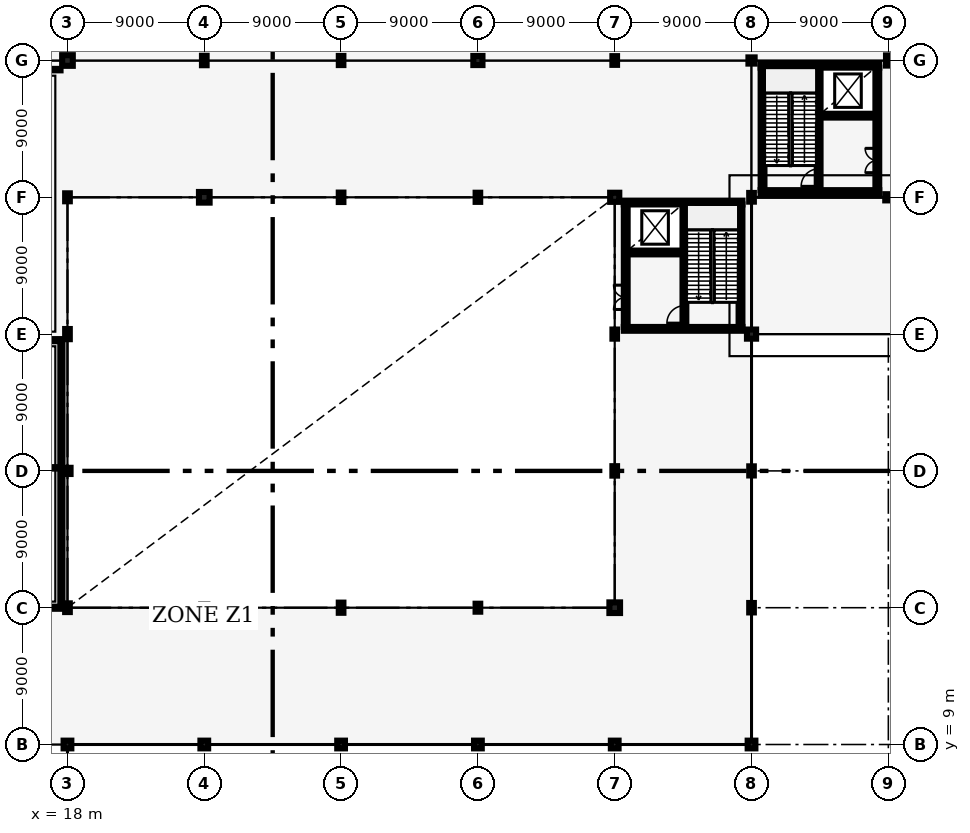
"""IFC4 building model, lengths in metres.
Left out: names, types, materials, properties, quantities, classifications, styles, units other than length and angle.
Written with IfcOpenShell. Run it as: python <this file> out.ifc"""

import sys

from ifc_helpers import new_model, si_unit, direction, frame, frame_2d, origin, origin_2d, place, context, subcontext, project, spatial, rectangle, hollow_circle, i_section, extrude, element, fill, save


model = new_model("IFC4")
c1 = context("Model", 3, precision=1e-05, world=origin(), true_north=direction((0.0, 1.0)))
c2 = subcontext(c1, "Body", "Model", "MODEL_VIEW")
j1 = project(units=[si_unit("LENGTHUNIT", "METRE"), si_unit("PLANEANGLEUNIT", "RADIAN")], contexts=[c1])
p1 = place(None, origin())
s1 = spatial("IfcSite", under=j1, at=p1, CompositionType="ELEMENT")
p2 = place(p1, origin())
s2 = spatial("IfcBuilding", under=s1, at=p2, CompositionType="ELEMENT")
p3 = place(p2, frame((0.0, 0.0, 6.0)))
s3 = spatial("IfcBuildingStorey", under=s2, at=p3, CompositionType="ELEMENT", Elevation=6.0)
p4 = place(p3, frame((18.0, 9.0, 0.0), z_axis=(0.0, 0.0, 1.0), x_axis=(1.0, 0.0, 0.0)))
e1 = element("IfcColumn", 1, at=p4, inside=s3, PredefinedType="COLUMN", context=c2, shape_type="SweptSolid", body=[
    extrude(hollow_circle(Radius=0.254, WallThickness=0.02, at=origin_2d()), origin(), (0.0, 0.0, 1.0), 6.0),
])
p5 = place(p3, frame((18.0, 18.0, 0.0), z_axis=(0.0, 0.0, 1.0), x_axis=(1.0, 0.0, 0.0)))
e2 = element("IfcColumn", 2, at=p5, inside=s3, PredefinedType="COLUMN", context=c2, shape_type="SweptSolid", body=[
    extrude(i_section(OverallWidth=0.306, OverallDepth=0.572, WebThickness=0.021, FlangeThickness=0.04, FilletRadius=0.027, at=origin_2d()), origin(), (0.0, 0.0, 1.0), 6.0),
])
p6 = place(p3, frame((18.0, 27.0, 0.0), z_axis=(0.0, 0.0, 1.0), x_axis=(1.0, 0.0, 0.0)))
e3 = element("IfcColumn", 3, at=p6, inside=s3, PredefinedType="COLUMN", context=c2, shape_type="SweptSolid", body=[
    extrude(hollow_circle(Radius=0.203, WallThickness=0.016, at=origin_2d()), origin(), (0.0, 0.0, 1.0), 6.0),
])
p7 = place(p3, frame((18.0, 36.0, 0.0), z_axis=(0.0, 0.0, 1.0), x_axis=(1.0, 0.0, 0.0)))
e4 = element("IfcColumn", 4, at=p7, inside=s3, PredefinedType="COLUMN", context=c2, shape_type="SweptSolid", body=[
    extrude(i_section(OverallWidth=0.305, OverallDepth=0.668, WebThickness=0.021, FlangeThickness=0.04, FilletRadius=0.027, at=origin_2d()), origin(), (0.0, 0.0, 1.0), 6.0),
])
p8 = place(p3, frame((18.0, 45.0, 0.0), z_axis=(0.0, 0.0, 1.0), x_axis=(1.0, 0.0, 0.0)))
e5 = element("IfcColumn", 5, at=p8, inside=s3, PredefinedType="COLUMN", context=c2, shape_type="SweptSolid", body=[
    extrude(i_section(OverallWidth=0.306, OverallDepth=0.524, WebThickness=0.021, FlangeThickness=0.04, FilletRadius=0.027, at=origin_2d()), origin(), (0.0, 0.0, 1.0), 6.0),
])
p9 = place(p3, frame((18.0, 54.0, 0.0), z_axis=(0.0, 0.0, 1.0), x_axis=(1.0, 0.0, 0.0)))
e6 = element("IfcColumn", 6, at=p9, inside=s3, PredefinedType="COLUMN", context=c2, shape_type="SweptSolid", body=[
    extrude(rectangle(XDim=0.7, YDim=0.7, at=origin_2d()), origin(), (0.0, 0.0, 1.0), 6.0),
])
p10 = place(p3, frame((27.0, 9.0, 0.0), z_axis=(0.0, 0.0, 1.0), x_axis=(1.0, 0.0, 0.0)))
e7 = element("IfcColumn", 7, at=p10, inside=s3, PredefinedType="COLUMN", context=c2, shape_type="SweptSolid", body=[
    extrude(hollow_circle(Radius=0.254, WallThickness=0.02, at=origin_2d()), origin(), (0.0, 0.0, 1.0), 6.0),
])
p11 = place(p3, frame((27.0, 18.0, 0.0), z_axis=(0.0, 0.0, 1.0), x_axis=(1.0, 0.0, 0.0)))
e8 = element("IfcColumn", 8, at=p11, inside=s3, PredefinedType="COLUMN", context=c2, shape_type="SweptSolid", body=[
    extrude(hollow_circle(Radius=0.203, WallThickness=0.016, at=origin_2d()), origin(), (0.0, 0.0, 1.0), 6.0),
])
p12 = place(p3, frame((27.0, 45.0, 0.0), z_axis=(0.0, 0.0, 1.0), x_axis=(1.0, 0.0, 0.0)))
e9 = element("IfcColumn", 9, at=p12, inside=s3, PredefinedType="COLUMN", context=c2, shape_type="SweptSolid", body=[
    extrude(rectangle(XDim=0.7, YDim=0.7, at=origin_2d()), origin(), (0.0, 0.0, 1.0), 6.0),
])
p13 = place(p3, frame((27.0, 54.0, 0.0), z_axis=(0.0, 0.0, 1.0), x_axis=(1.0, 0.0, 0.0)))
e10 = element("IfcColumn", 10, at=p13, inside=s3, PredefinedType="COLUMN", context=c2, shape_type="SweptSolid", body=[
    extrude(i_section(OverallWidth=0.305, OverallDepth=0.62, WebThickness=0.021, FlangeThickness=0.04, FilletRadius=0.027, at=origin_2d()), origin(), (0.0, 0.0, 1.0), 6.0),
])
p14 = place(p3, frame((36.0, 9.0, 0.0), z_axis=(0.0, 0.0, 1.0), x_axis=(1.0, 0.0, 0.0)))
e11 = element("IfcColumn", 11, at=p14, inside=s3, PredefinedType="COLUMN", context=c2, shape_type="SweptSolid", body=[
    extrude(hollow_circle(Radius=0.254, WallThickness=0.02, at=origin_2d()), origin(), (0.0, 0.0, 1.0), 6.0),
])
p15 = place(p3, frame((36.0, 18.0, 0.0), z_axis=(0.0, 0.0, 1.0), x_axis=(1.0, 0.0, 0.0)))
e12 = element("IfcColumn", 12, at=p15, inside=s3, PredefinedType="COLUMN", context=c2, shape_type="SweptSolid", body=[
    extrude(i_section(OverallWidth=0.305, OverallDepth=0.668, WebThickness=0.021, FlangeThickness=0.04, FilletRadius=0.027, at=origin_2d()), origin(), (0.0, 0.0, 1.0), 6.0),
])
p16 = place(p3, frame((36.0, 45.0, 0.0), z_axis=(0.0, 0.0, 1.0), x_axis=(1.0, 0.0, 0.0)))
e13 = element("IfcColumn", 13, at=p16, inside=s3, PredefinedType="COLUMN", context=c2, shape_type="SweptSolid", body=[
    extrude(i_section(OverallWidth=0.305, OverallDepth=0.62, WebThickness=0.021, FlangeThickness=0.04, FilletRadius=0.027, at=origin_2d()), origin(), (0.0, 0.0, 1.0), 6.0),
])
p17 = place(p3, frame((36.0, 54.0, 0.0), z_axis=(0.0, 0.0, 1.0), x_axis=(1.0, 0.0, 0.0)))
e14 = element("IfcColumn", 14, at=p17, inside=s3, PredefinedType="COLUMN", context=c2, shape_type="SweptSolid", body=[
    extrude(i_section(OverallWidth=0.3, OverallDepth=0.6, WebThickness=0.015, FlangeThickness=0.03, FilletRadius=0.027, at=origin_2d()), origin(), (0.0, 0.0, 1.0), 6.0),
])
p18 = place(p3, frame((45.0, 9.0, 0.0), z_axis=(0.0, 0.0, 1.0), x_axis=(1.0, 0.0, 0.0)))
e15 = element("IfcColumn", 15, at=p18, inside=s3, PredefinedType="COLUMN", context=c2, shape_type="SweptSolid", body=[
    extrude(hollow_circle(Radius=0.254, WallThickness=0.02, at=origin_2d()), origin(), (0.0, 0.0, 1.0), 6.0),
])
p19 = place(p3, frame((45.0, 18.0, 0.0), z_axis=(0.0, 0.0, 1.0), x_axis=(1.0, 0.0, 0.0)))
e16 = element("IfcColumn", 16, at=p19, inside=s3, PredefinedType="COLUMN", context=c2, shape_type="SweptSolid", body=[
    extrude(i_section(OverallWidth=0.306, OverallDepth=0.524, WebThickness=0.021, FlangeThickness=0.04, FilletRadius=0.027, at=origin_2d()), origin(), (0.0, 0.0, 1.0), 6.0),
])
p20 = place(p3, frame((45.0, 45.0, 0.0), z_axis=(0.0, 0.0, 1.0), x_axis=(1.0, 0.0, 0.0)))
e17 = element("IfcColumn", 17, at=p20, inside=s3, PredefinedType="COLUMN", context=c2, shape_type="SweptSolid", body=[
    extrude(i_section(OverallWidth=0.3, OverallDepth=0.6, WebThickness=0.015, FlangeThickness=0.03, FilletRadius=0.027, at=origin_2d()), origin(), (0.0, 0.0, 1.0), 6.0),
])
p21 = place(p3, frame((45.0, 54.0, 0.0), z_axis=(0.0, 0.0, 1.0), x_axis=(1.0, 0.0, 0.0)))
e18 = element("IfcColumn", 18, at=p21, inside=s3, PredefinedType="COLUMN", context=c2, shape_type="SweptSolid", body=[
    extrude(rectangle(XDim=0.6, YDim=0.6, at=origin_2d()), origin(), (0.0, 0.0, 1.0), 6.0),
])
p22 = place(p3, frame((54.0, 9.0, 0.0), z_axis=(0.0, 0.0, 1.0), x_axis=(1.0, 0.0, 0.0)))
e19 = element("IfcColumn", 19, at=p22, inside=s3, PredefinedType="COLUMN", context=c2, shape_type="SweptSolid", body=[
    extrude(hollow_circle(Radius=0.254, WallThickness=0.02, at=origin_2d()), origin(), (0.0, 0.0, 1.0), 6.0),
])
p23 = place(p3, frame((54.0, 18.0, 0.0), z_axis=(0.0, 0.0, 1.0), x_axis=(1.0, 0.0, 0.0)))
e20 = element("IfcColumn", 20, at=p23, inside=s3, PredefinedType="COLUMN", context=c2, shape_type="SweptSolid", body=[
    extrude(rectangle(XDim=0.7, YDim=0.7, at=origin_2d()), origin(), (0.0, 0.0, 1.0), 6.0),
])
p24 = place(p3, frame((54.0, 27.0, 0.0), z_axis=(0.0, 0.0, 1.0), x_axis=(1.0, 0.0, 0.0)))
e21 = element("IfcColumn", 21, at=p24, inside=s3, PredefinedType="COLUMN", context=c2, shape_type="SweptSolid", body=[
    extrude(i_section(OverallWidth=0.305, OverallDepth=0.62, WebThickness=0.021, FlangeThickness=0.04, FilletRadius=0.027, at=origin_2d()), origin(), (0.0, 0.0, 1.0), 6.0),
])
p25 = place(p3, frame((54.0, 36.0, 0.0), z_axis=(0.0, 0.0, 1.0), x_axis=(1.0, 0.0, 0.0)))
e22 = element("IfcColumn", 22, at=p25, inside=s3, PredefinedType="COLUMN", context=c2, shape_type="SweptSolid", body=[
    extrude(i_section(OverallWidth=0.3, OverallDepth=0.6, WebThickness=0.015, FlangeThickness=0.03, FilletRadius=0.027, at=origin_2d()), origin(), (0.0, 0.0, 1.0), 6.0),
])
p26 = place(p3, frame((54.0, 45.0, 0.0), z_axis=(0.0, 0.0, 1.0), x_axis=(1.0, 0.0, 0.0)))
e23 = element("IfcColumn", 23, at=p26, inside=s3, PredefinedType="COLUMN", context=c2, shape_type="SweptSolid", body=[
    extrude(rectangle(XDim=0.6, YDim=0.6, at=origin_2d()), origin(), (0.0, 0.0, 1.0), 6.0),
])
p27 = place(p3, frame((54.0, 54.0, 0.0), z_axis=(0.0, 0.0, 1.0), x_axis=(1.0, 0.0, 0.0)))
e24 = element("IfcColumn", 24, at=p27, inside=s3, PredefinedType="COLUMN", context=c2, shape_type="SweptSolid", body=[
    extrude(i_section(OverallWidth=0.306, OverallDepth=0.572, WebThickness=0.021, FlangeThickness=0.04, FilletRadius=0.027, at=origin_2d()), origin(), (0.0, 0.0, 1.0), 6.0),
])
p28 = place(p3, frame((63.0, 9.0, 0.0), z_axis=(0.0, 0.0, 1.0), x_axis=(1.0, 0.0, 0.0)))
e25 = element("IfcColumn", 25, at=p28, inside=s3, PredefinedType="COLUMN", context=c2, shape_type="SweptSolid", body=[
    extrude(hollow_circle(Radius=0.254, WallThickness=0.02, at=origin_2d()), origin(), (0.0, 0.0, 1.0), 6.0),
])
p29 = place(p3, frame((63.0, 18.0, 0.0), z_axis=(0.0, 0.0, 1.0), x_axis=(1.0, 0.0, 0.0)))
e26 = element("IfcColumn", 26, at=p29, inside=s3, PredefinedType="COLUMN", context=c2, shape_type="SweptSolid", body=[
    extrude(i_section(OverallWidth=0.305, OverallDepth=0.62, WebThickness=0.021, FlangeThickness=0.04, FilletRadius=0.027, at=origin_2d()), origin(), (0.0, 0.0, 1.0), 6.0),
])
p30 = place(p3, frame((63.0, 27.0, 0.0), z_axis=(0.0, 0.0, 1.0), x_axis=(1.0, 0.0, 0.0)))
e27 = element("IfcColumn", 27, at=p30, inside=s3, PredefinedType="COLUMN", context=c2, shape_type="SweptSolid", body=[
    extrude(i_section(OverallWidth=0.3, OverallDepth=0.6, WebThickness=0.015, FlangeThickness=0.03, FilletRadius=0.027, at=origin_2d()), origin(), (0.0, 0.0, 1.0), 6.0),
])
p31 = place(p3, frame((63.0, 36.0, 0.0), z_axis=(0.0, 0.0, 1.0), x_axis=(1.0, 0.0, 0.0)))
e28 = element("IfcColumn", 28, at=p31, inside=s3, PredefinedType="COLUMN", context=c2, shape_type="SweptSolid", body=[
    extrude(rectangle(XDim=0.6, YDim=0.6, at=origin_2d()), origin(), (0.0, 0.0, 1.0), 6.0),
])
p32 = place(p3, frame((63.0, 45.0, 0.0), z_axis=(0.0, 0.0, 1.0), x_axis=(1.0, 0.0, 0.0)))
e29 = element("IfcColumn", 29, at=p32, inside=s3, PredefinedType="COLUMN", context=c2, shape_type="SweptSolid", body=[
    extrude(i_section(OverallWidth=0.306, OverallDepth=0.572, WebThickness=0.021, FlangeThickness=0.04, FilletRadius=0.027, at=origin_2d()), origin(), (0.0, 0.0, 1.0), 6.0),
])
for number, where, z_axis, x_axis in (
    (30, (63.0, 54.0, 0.0), (0.0, 0.0, 1.0), (1.0, 0.0, 0.0)),
    (31, (72.0, 45.0, 0.0), (0.0, 0.0, 1.0), (1.0, 0.0, 0.0)),
):
    element("IfcColumn", number, at=place(p3, frame(where, z_axis=z_axis, x_axis=x_axis)), inside=s3, PredefinedType="COLUMN", context=c2, shape_type="SweptSolid", body=[
        extrude(hollow_circle(Radius=0.203, WallThickness=0.016, at=origin_2d()), origin(), (0.0, 0.0, 1.0), 6.0),
    ])
p33 = place(p3, frame((72.0, 54.0, 0.0), z_axis=(0.0, 0.0, 1.0), x_axis=(1.0, 0.0, 0.0)))
e32 = element("IfcColumn", 32, at=p33, inside=s3, PredefinedType="COLUMN", context=c2, shape_type="SweptSolid", body=[
    extrude(i_section(OverallWidth=0.305, OverallDepth=0.668, WebThickness=0.021, FlangeThickness=0.04, FilletRadius=0.027, at=origin_2d()), origin(), (0.0, 0.0, 1.0), 6.0),
])
p34 = place(p3, frame((54.725, 36.47, 0.0), z_axis=(0.0, 0.0, 1.0), x_axis=(0.0, 1.0, 0.0)))
e33 = element("IfcWall", 33, at=p34, inside=s3, PredefinedType="SHEAR", context=c2, shape_type="SweptSolid", body=[
    extrude(rectangle(XDim=8.06, YDim=0.25, at=frame_2d((4.03, 0.0))), origin(), (0.0, 0.0, 1.0), 5.7),
])
p35 = place(p34, frame((1.15, 0.0, 0.0)))
e34 = element("IfcOpeningElement", 34, at=p35, cuts=e33, PredefinedType="OPENING", context=c2, shape_type="SweptSolid", body=[
    extrude(rectangle(XDim=1.6, YDim=2.2, at=frame_2d((0.8, 1.1))), frame((0.0, 0.135, 0.0), z_axis=(0.0, -1.0, 0.0), x_axis=(1.0, 0.0, 0.0)), (0.0, 0.0, 1.0), 0.27),
])
p36 = place(p3, frame((62.275, 36.47, 0.0), z_axis=(0.0, 0.0, 1.0), x_axis=(0.0, 1.0, 0.0)))
e35 = element("IfcWall", 35, at=p36, inside=s3, PredefinedType="SHEAR", context=c2, shape_type="SweptSolid", body=[
    extrude(rectangle(XDim=8.06, YDim=0.25, at=frame_2d((4.03, 0.0))), origin(), (0.0, 0.0, 1.0), 5.7),
])
for number, where, z_axis, x_axis in (
    (36, (54.6, 36.345, 0.0), (0.0, 0.0, 1.0), (1.0, 0.0, 0.0)),
    (37, (54.6, 44.655, 0.0), (0.0, 0.0, 1.0), (1.0, 0.0, 0.0)),
):
    element("IfcWall", number, at=place(p3, frame(where, z_axis=z_axis, x_axis=x_axis)), inside=s3, PredefinedType="SHEAR", context=c2, shape_type="SweptSolid", body=[
        extrude(rectangle(XDim=7.8, YDim=0.25, at=frame_2d((3.9, 0.0))), origin(), (0.0, 0.0, 1.0), 5.7),
    ])
p37 = place(p3, frame((58.585, 36.47, 0.0), z_axis=(0.0, 0.0, 1.0), x_axis=(0.0, 1.0, 0.0)))
e38 = element("IfcWall", 38, at=p37, inside=s3, PredefinedType="SHEAR", context=c2, shape_type="SweptSolid", body=[
    extrude(rectangle(XDim=8.06, YDim=0.25, at=frame_2d((4.03, 0.0))), origin(), (0.0, 0.0, 1.0), 5.7),
])
p38 = place(p37, frame((0.25, 0.0, 0.0)))
e39 = element("IfcOpeningElement", 39, at=p38, cuts=e38, PredefinedType="OPENING", context=c2, shape_type="SweptSolid", body=[
    extrude(rectangle(XDim=1.15, YDim=2.15, at=frame_2d((0.575, 1.075))), frame((0.0, 0.135, 0.0), z_axis=(0.0, -1.0, 0.0), x_axis=(1.0, 0.0, 0.0)), (0.0, 0.0, 1.0), 0.27),
])
p39 = place(p3, frame((54.85, 41.37, 0.0), z_axis=(0.0, 0.0, 1.0), x_axis=(1.0, 0.0, 0.0)))
e40 = element("IfcWall", 40, at=p39, inside=s3, PredefinedType="SHEAR", context=c2, shape_type="SweptSolid", body=[
    extrude(rectangle(XDim=3.61, YDim=0.25, at=frame_2d((1.805, 0.0))), origin(), (0.0, 0.0, 1.0), 5.7),
])
p40 = place(p39, frame((0.95, 0.0, 0.0)))
e41 = element("IfcOpeningElement", 41, at=p40, cuts=e40, PredefinedType="OPENING", context=c2, shape_type="SweptSolid", body=[
    extrude(rectangle(XDim=1.2, YDim=2.2, at=frame_2d((0.6, 1.1))), frame((0.0, 0.135, 0.0), z_axis=(0.0, -1.0, 0.0), x_axis=(1.0, 0.0, 0.0)), (0.0, 0.0, 1.0), 0.27),
])
p41 = place(p3, frame((63.725, 45.47, 0.0), z_axis=(0.0, 0.0, 1.0), x_axis=(0.0, 1.0, 0.0)))
e42 = element("IfcWall", 42, at=p41, inside=s3, PredefinedType="SHEAR", context=c2, shape_type="SweptSolid", body=[
    extrude(rectangle(XDim=8.06, YDim=0.25, at=frame_2d((4.03, 0.0))), origin(), (0.0, 0.0, 1.0), 5.71),
])
p42 = place(p3, frame((71.275, 45.47, 0.0), z_axis=(0.0, 0.0, 1.0), x_axis=(0.0, 1.0, 0.0)))
e43 = element("IfcWall", 43, at=p42, inside=s3, PredefinedType="SHEAR", context=c2, shape_type="SweptSolid", body=[
    extrude(rectangle(XDim=8.06, YDim=0.25, at=frame_2d((4.03, 0.0))), origin(), (0.0, 0.0, 1.0), 5.71),
])
p43 = place(p42, frame((1.15, 0.0, 0.0)))
e44 = element("IfcOpeningElement", 44, at=p43, cuts=e43, PredefinedType="OPENING", context=c2, shape_type="SweptSolid", body=[
    extrude(rectangle(XDim=1.6, YDim=2.2, at=frame_2d((0.8, 1.1))), frame((0.0, 0.135, 0.0), z_axis=(0.0, -1.0, 0.0), x_axis=(1.0, 0.0, 0.0)), (0.0, 0.0, 1.0), 0.27),
])
for number, where, z_axis, x_axis in (
    (45, (63.6, 45.345, 0.0), (0.0, 0.0, 1.0), (1.0, 0.0, 0.0)),
    (46, (63.6, 53.655, 0.0), (0.0, 0.0, 1.0), (1.0, 0.0, 0.0)),
):
    element("IfcWall", number, at=place(p3, frame(where, z_axis=z_axis, x_axis=x_axis)), inside=s3, PredefinedType="SHEAR", context=c2, shape_type="SweptSolid", body=[
        extrude(rectangle(XDim=7.8, YDim=0.25, at=frame_2d((3.9, 0.0))), origin(), (0.0, 0.0, 1.0), 5.71),
    ])
p44 = place(p3, frame((67.415, 45.47, 0.0), z_axis=(0.0, 0.0, 1.0), x_axis=(0.0, 1.0, 0.0)))
e47 = element("IfcWall", 47, at=p44, inside=s3, PredefinedType="SHEAR", context=c2, shape_type="SweptSolid", body=[
    extrude(rectangle(XDim=8.06, YDim=0.25, at=frame_2d((4.03, 0.0))), origin(), (0.0, 0.0, 1.0), 5.71),
])
p45 = place(p44, frame((0.25, 0.0, 0.0)))
e48 = element("IfcOpeningElement", 48, at=p45, cuts=e47, PredefinedType="OPENING", context=c2, shape_type="SweptSolid", body=[
    extrude(rectangle(XDim=1.15, YDim=2.15, at=frame_2d((0.575, 1.075))), frame((0.0, 0.135, 0.0), z_axis=(0.0, -1.0, 0.0), x_axis=(1.0, 0.0, 0.0)), (0.0, 0.0, 1.0), 0.27),
])
p46 = place(p3, frame((67.54, 50.37, 0.0), z_axis=(0.0, 0.0, 1.0), x_axis=(1.0, 0.0, 0.0)))
e49 = element("IfcWall", 49, at=p46, inside=s3, PredefinedType="SHEAR", context=c2, shape_type="SweptSolid", body=[
    extrude(rectangle(XDim=3.61, YDim=0.25, at=frame_2d((1.805, 0.0))), origin(), (0.0, 0.0, 1.0), 5.71),
])
p47 = place(p46, frame((0.95, 0.0, 0.0)))
e50 = element("IfcOpeningElement", 50, at=p47, cuts=e49, PredefinedType="OPENING", context=c2, shape_type="SweptSolid", body=[
    extrude(rectangle(XDim=1.2, YDim=2.2, at=frame_2d((0.6, 1.1))), frame((0.0, 0.135, 0.0), z_axis=(0.0, -1.0, 0.0), x_axis=(1.0, 0.0, 0.0)), (0.0, 0.0, 1.0), 0.27),
])
p48 = place(p3, frame((9.0, 18.0, 0.0), z_axis=(0.0, 0.0, 1.0), x_axis=(1.0, 0.0, 0.0)))
e51 = element("IfcWall", 51, at=p48, inside=s3, PredefinedType="PARTITIONING", context=c2, shape_type="SweptSolid", body=[
    extrude(rectangle(XDim=8.6, YDim=0.14, at=frame_2d((4.3, 0.0))), origin(), (0.0, 0.0, 1.0), 4.85),
])
p49 = place(p48, frame((1.45, 0.0, 0.0)))
e52 = element("IfcOpeningElement", 52, at=p49, cuts=e51, PredefinedType="OPENING", context=c2, shape_type="SweptSolid", body=[
    extrude(rectangle(XDim=1.08, YDim=2.18, at=frame_2d((0.54, 1.09))), frame((0.0, 0.08, 0.0), z_axis=(0.0, -1.0, 0.0), x_axis=(1.0, 0.0, 0.0)), (0.0, 0.0, 1.0), 0.16),
])
p50 = place(p3, frame((9.084, 35.6, 0.0), z_axis=(0.0, 0.0, 1.0), x_axis=(1.0, 0.0, 0.0)))
e53 = element("IfcWall", 53, at=p50, inside=s3, PredefinedType="PARTITIONING", context=c2, shape_type="SweptSolid", body=[
    extrude(rectangle(XDim=8.432, YDim=0.14, at=frame_2d((4.216, 0.0))), origin(), (0.0, 0.0, 1.0), 4.85),
])
p51 = place(p3, frame((17.6, 18.084, 0.0), z_axis=(0.0, 0.0, 1.0), x_axis=(0.0, 1.0, 0.0)))
e54 = element("IfcWall", 54, at=p51, inside=s3, PredefinedType="PARTITIONING", context=c2, shape_type="SweptSolid", body=[
    extrude(rectangle(XDim=17.432, YDim=0.14, at=frame_2d((8.716, 0.0))), origin(), (0.0, 0.0, 1.0), 4.85),
])
p52 = place(p3, frame((0.6, 27.2, 0.0), z_axis=(0.0, 0.0, 1.0), x_axis=(1.0, 0.0, 0.0)))
e55 = element("IfcWall", 55, at=p52, inside=s3, PredefinedType="PARTITIONING", context=c2, shape_type="SweptSolid", body=[
    extrude(rectangle(XDim=17.0, YDim=0.095, at=frame_2d((8.5, 0.0))), origin(), (0.0, 0.0, 1.0), 4.85),
])
p53 = place(p52, frame((9.85, 0.0, 0.0)))
e56 = element("IfcOpeningElement", 56, at=p53, cuts=e55, PredefinedType="OPENING", context=c2, shape_type="SweptSolid", body=[
    extrude(rectangle(XDim=1.02, YDim=2.15, at=frame_2d((0.51, 1.075))), frame((0.0, 0.057, 0.0), z_axis=(0.0, -1.0, 0.0), x_axis=(1.0, 0.0, 0.0)), (0.0, 0.0, 1.0), 0.115),
])
p54 = place(p3, frame((0.657, 53.4, 0.0), z_axis=(0.0, 0.0, 1.0), x_axis=(1.0, 0.0, 0.0)))
e57 = element("IfcWall", 57, at=p54, inside=s3, PredefinedType="PARTITIONING", context=c2, shape_type="SweptSolid", body=[
    extrude(rectangle(XDim=16.886, YDim=0.095, at=frame_2d((8.443, 0.0))), origin(), (0.0, 0.0, 1.0), 4.85),
])
p55 = place(p38, origin())
e58 = element("IfcDoor", 58, at=p55, inside=s3, OperationType="SINGLE_SWING_LEFT", PredefinedType="DOOR", context=c2, shape_type="SweptSolid", body=[
    extrude(rectangle(XDim=1.15, YDim=2.15, at=frame_2d((0.575, 1.075))), frame((0.0, 0.025, 0.0), z_axis=(0.0, -1.0, 0.0), x_axis=(1.0, 0.0, 0.0)), (0.0, 0.0, 1.0), 0.05),
])
fill(e39, e58)
p56 = place(p40, origin())
e59 = element("IfcDoor", 59, at=p56, inside=s3, OperationType="DOUBLE_DOOR_SLIDING", PredefinedType="DOOR", context=c2, shape_type="SweptSolid", body=[
    extrude(rectangle(XDim=1.2, YDim=2.2, at=frame_2d((0.6, 1.1))), frame((0.0, 0.025, 0.0), z_axis=(0.0, -1.0, 0.0), x_axis=(1.0, 0.0, 0.0)), (0.0, 0.0, 1.0), 0.05),
])
fill(e41, e59)
p57 = place(p35, origin())
e60 = element("IfcDoor", 60, at=p57, inside=s3, OperationType="DOUBLE_DOOR_SINGLE_SWING", PredefinedType="DOOR", context=c2, shape_type="SweptSolid", body=[
    extrude(rectangle(XDim=1.6, YDim=2.2, at=frame_2d((0.8, 1.1))), frame((0.0, 0.025, 0.0), z_axis=(0.0, -1.0, 0.0), x_axis=(1.0, 0.0, 0.0)), (0.0, 0.0, 1.0), 0.05),
])
fill(e34, e60)
p58 = place(p45, origin())
e61 = element("IfcDoor", 61, at=p58, inside=s3, OperationType="SINGLE_SWING_LEFT", PredefinedType="DOOR", context=c2, shape_type="SweptSolid", body=[
    extrude(rectangle(XDim=1.15, YDim=2.15, at=frame_2d((0.575, 1.075))), frame((0.0, 0.025, 0.0), z_axis=(0.0, -1.0, 0.0), x_axis=(1.0, 0.0, 0.0)), (0.0, 0.0, 1.0), 0.05),
])
fill(e48, e61)
p59 = place(p47, origin())
e62 = element("IfcDoor", 62, at=p59, inside=s3, OperationType="DOUBLE_DOOR_SLIDING", PredefinedType="DOOR", context=c2, shape_type="SweptSolid", body=[
    extrude(rectangle(XDim=1.2, YDim=2.2, at=frame_2d((0.6, 1.1))), frame((0.0, 0.025, 0.0), z_axis=(0.0, -1.0, 0.0), x_axis=(1.0, 0.0, 0.0)), (0.0, 0.0, 1.0), 0.05),
])
fill(e50, e62)
p60 = place(p43, origin())
e63 = element("IfcDoor", 63, at=p60, inside=s3, OperationType="DOUBLE_DOOR_SINGLE_SWING", PredefinedType="DOOR", context=c2, shape_type="SweptSolid", body=[
    extrude(rectangle(XDim=1.6, YDim=2.2, at=frame_2d((0.8, 1.1))), frame((0.0, 0.025, 0.0), z_axis=(0.0, -1.0, 0.0), x_axis=(1.0, 0.0, 0.0)), (0.0, 0.0, 1.0), 0.05),
])
fill(e44, e63)
save(model, sys.argv[1])
